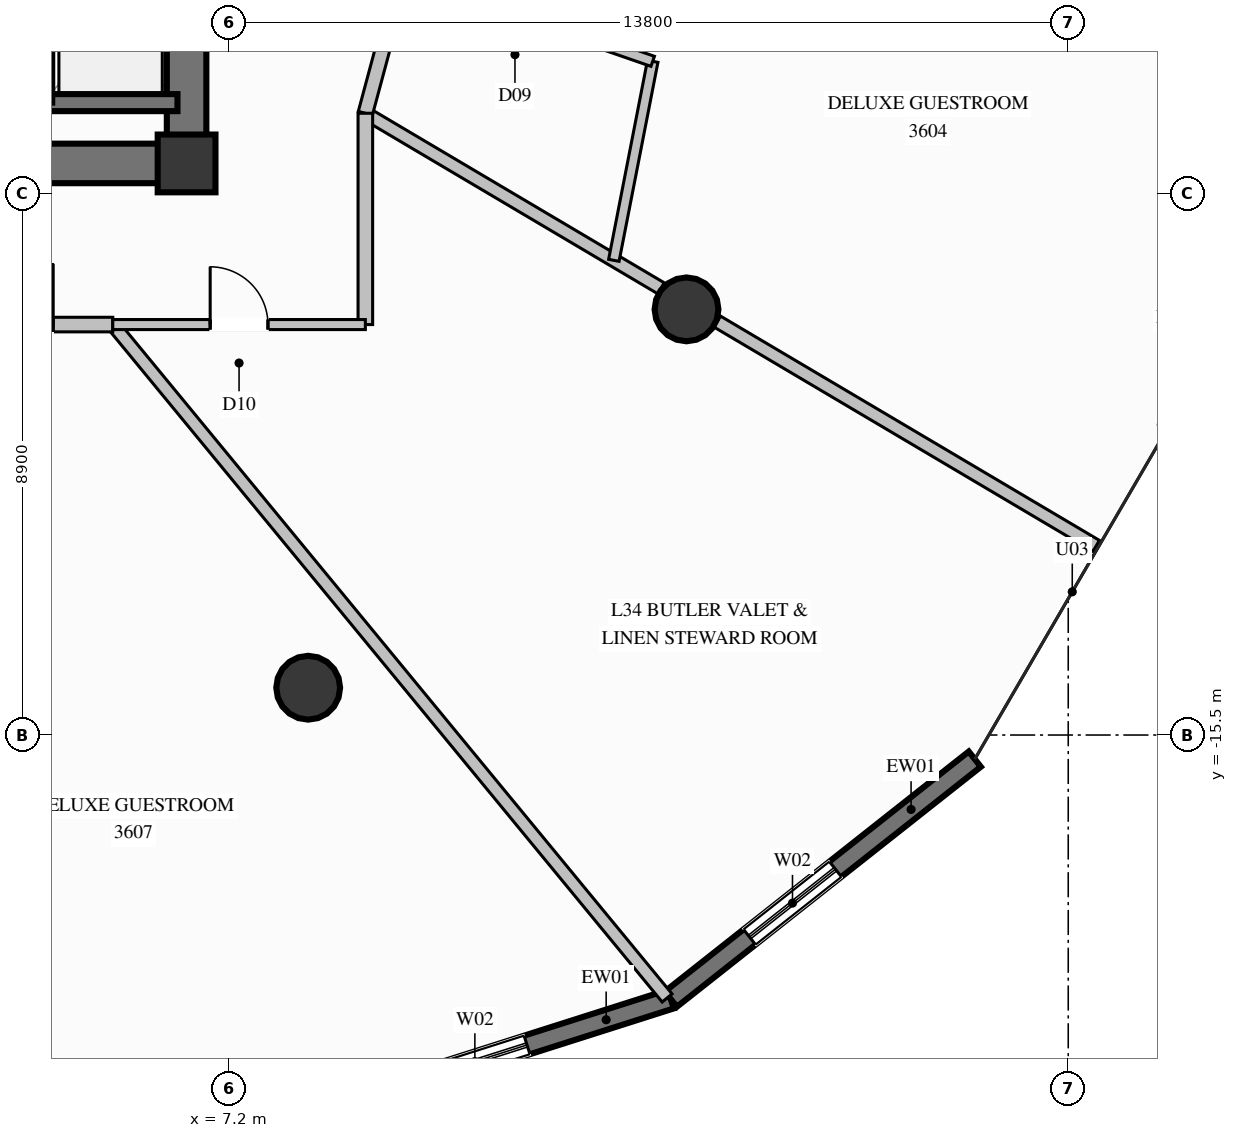
"""IFC4 building model, lengths in metres.
Left out: names, types, materials, properties, quantities, classifications, styles, units other than length and angle.
Written with IfcOpenShell. Run it as: python <this file> out.ifc"""

import sys

from ifc_helpers import new_model, si_unit, direction, frame, frame_2d, origin, origin_2d, place, context, subcontext, project, spatial, rectangle, circle, extrude, element, fill, save


model = new_model("IFC4")
c1 = context("Model", 3, precision=1e-05, world=origin(), true_north=direction((0.0, 1.0)))
c2 = subcontext(c1, "Body", "Model", "MODEL_VIEW")
j1 = project(units=[si_unit("LENGTHUNIT", "METRE"), si_unit("PLANEANGLEUNIT", "RADIAN")], contexts=[c1])
p1 = place(None, origin())
s1 = spatial("IfcSite", under=j1, at=p1, CompositionType="ELEMENT")
p2 = place(p1, origin())
s2 = spatial("IfcBuilding", under=s1, at=p2, CompositionType="ELEMENT")
p3 = place(p2, frame((0.0, 0.0, 135.0)))
s3 = spatial("IfcBuildingStorey", under=s2, at=p3, CompositionType="ELEMENT", Elevation=135.0)
p4 = place(p3, frame((6.5, -6.1, 0.0), z_axis=(0.0, 0.0, 1.0), x_axis=(1.0, 0.0, 0.0)))
e1 = element("IfcColumn", 1, at=p4, inside=s3, PredefinedType="COLUMN", context=c2, shape_type="SweptSolid", body=[
    extrude(rectangle(XDim=0.95, YDim=0.95, at=origin_2d()), origin(), (0.0, 0.0, 1.0), 3.6),
])
p5 = place(p3, frame((4.15, -6.1, 0.0), z_axis=(0.0, 0.0, 1.0), x_axis=(1.0, 0.0, 0.0)))
e2 = element("IfcWall", 2, at=p5, inside=s3, PredefinedType="SHEAR", context=c2, shape_type="SweptSolid", body=[
    extrude(rectangle(XDim=2.025, YDim=0.65, at=frame_2d((1.013, 0.0))), origin(), (0.0, 0.0, 1.0), 3.6),
])
p6 = place(p3, frame((6.5, -6.425, 0.0), z_axis=(0.0, 0.0, 1.0), x_axis=(0.0, 1.0, 0.0)))
e3 = element("IfcWall", 3, at=p6, inside=s3, PredefinedType="SHEAR", context=c2, shape_type="SweptSolid", body=[
    extrude(rectangle(XDim=4.075, YDim=0.65, at=frame_2d((2.038, 0.0))), origin(), (0.0, 0.0, 1.0), 3.6),
])
for number, where, z_axis, x_axis in (
    (4, (8.5, -14.722, 0.0), (0.0, 0.0, 1.0), (1.0, 0.0, 0.0)),
    (5, (14.722, -8.5, 0.0), (0.0, 0.0, 1.0), (1.0, 0.0, 0.0)),
):
    element("IfcColumn", number, at=place(p3, frame(where, z_axis=z_axis, x_axis=x_axis)), inside=s3, PredefinedType="COLUMN", context=c2, shape_type="SweptSolid", body=[
        extrude(circle(Radius=0.525, at=origin_2d()), origin(), (0.0, 0.0, 1.0), 3.6),
    ])
p7 = place(p3, frame((14.464, -19.844, 0.0), z_axis=(0.0, 0.0, 1.0), x_axis=(-0.952914626631, -0.303238708533, 0.0)))
e6 = element("IfcWall", 6, at=p7, inside=s3, PredefinedType="SOLIDWALL", context=c2, shape_type="SweptSolid", body=[
    extrude(rectangle(XDim=6.612, YDim=0.32, at=frame_2d((3.306, 0.0))), origin(), (0.0, 0.0, 1.0), 3.35),
])
p8 = place(p7, frame((2.482, 0.0, 0.35)))
e7 = element("IfcOpeningElement", 7, at=p8, cuts=e6, PredefinedType="OPENING", context=c2, shape_type="SweptSolid", body=[
    extrude(rectangle(XDim=1.8, YDim=2.6, at=frame_2d((0.9, 1.3))), frame((0.0, 0.17, 0.0), z_axis=(0.0, -1.0, 0.0), x_axis=(1.0, 0.0, 0.0)), (0.0, 0.0, 1.0), 0.34),
])
p9 = place(p3, frame((19.463, -15.897, 0.0), z_axis=(0.0, 0.0, 1.0), x_axis=(-0.784835666651, -0.619703942503, 0.0)))
e8 = element("IfcWall", 8, at=p9, inside=s3, PredefinedType="SOLIDWALL", context=c2, shape_type="SweptSolid", body=[
    extrude(rectangle(XDim=6.369, YDim=0.32, at=frame_2d((3.185, 0.0))), origin(), (0.0, 0.0, 1.0), 3.35),
])
p10 = place(p9, frame((2.92, 0.0, 0.35)))
e9 = element("IfcOpeningElement", 9, at=p10, cuts=e8, PredefinedType="OPENING", context=c2, shape_type="SweptSolid", body=[
    extrude(rectangle(XDim=1.8, YDim=2.6, at=frame_2d((0.9, 1.3))), frame((0.0, 0.17, 0.0), z_axis=(0.0, -1.0, 0.0), x_axis=(1.0, 0.0, 0.0)), (0.0, 0.0, 1.0), 0.34),
])
p11 = place(p3, frame((4.15, -5.1, 0.0), z_axis=(0.0, 0.0, 1.0), x_axis=(1.0, 0.0, 0.0)))
e10 = element("IfcWall", 10, at=p11, inside=s3, PredefinedType="SOLIDWALL", context=c2, shape_type="SweptSolid", body=[
    extrude(rectangle(XDim=2.2, YDim=0.28, at=frame_2d((1.1, 0.0))), origin(), (0.0, 0.0, 1.0), 3.35),
])
p12 = place(p3, frame((4.15, -2.4, 0.0), z_axis=(0.0, 0.0, 1.0), x_axis=(0.0, -1.0, 0.0)))
e11 = element("IfcWall", 11, at=p12, inside=s3, PredefinedType="SOLIDWALL", context=c2, shape_type="SweptSolid", body=[
    extrude(rectangle(XDim=2.7, YDim=0.28, at=frame_2d((1.35, 0.0))), origin(), (0.0, 0.0, 1.0), 3.35),
])
p13 = place(p3, frame((9.44, -5.275, 0.0), z_axis=(0.0, 0.0, 1.0), x_axis=(0.860527977628, -0.509403179927, 0.0)))
e12 = element("IfcWall", 12, at=p13, inside=s3, PredefinedType="PARTITIONING", context=c2, shape_type="SweptSolid", body=[
    extrude(rectangle(XDim=5.65, YDim=0.21, at=frame_2d((2.825, 0.0))), origin(), (0.0, 0.0, 1.0), 2.717),
])
p14 = place(p3, frame((15.228, -8.701, 0.0), z_axis=(0.0, 0.0, 1.0), x_axis=(0.860535668123, -0.509390188253, 0.0)))
e13 = element("IfcWall", 13, at=p14, inside=s3, PredefinedType="PARTITIONING", context=c2, shape_type="SweptSolid", body=[
    extrude(rectangle(XDim=7.242, YDim=0.21, at=frame_2d((3.621, 0.0))), origin(), (0.0, 0.0, 1.0), 3.35),
])
p15 = place(p3, frame((9.44, -5.275, 0.0), z_axis=(0.0, 0.0, 1.0), x_axis=(0.25988439237, 0.965639737481, 0.0)))
e14 = element("IfcWall", 14, at=p15, inside=s3, PredefinedType="PARTITIONING", context=c2, shape_type="SweptSolid", body=[
    extrude(rectangle(XDim=2.359, YDim=0.24, at=frame_2d((1.179, 0.0))), origin(), (0.0, 0.0, 1.0), 3.35),
])
p16 = place(p3, frame((13.527, -7.694, 0.0), z_axis=(0.0, 0.0, 1.0), x_axis=(0.191580880293, 0.981476829225, 0.0)))
e15 = element("IfcWall", 15, at=p16, inside=s3, PredefinedType="PLUMBINGWALL", context=c2, shape_type="SweptSolid", body=[
    extrude(rectangle(XDim=3.335, YDim=0.175, at=frame_2d((1.667, 0.0))), origin(), (0.0, 0.0, 1.0), 3.35),
])
p17 = place(p3, frame((10.053, -2.997, 0.0), z_axis=(0.0, 0.0, 1.0), x_axis=(0.944980071375, -0.327127902669, 0.0)))
e16 = element("IfcWall", 16, at=p17, inside=s3, PredefinedType="PLUMBINGWALL", context=c2, shape_type="SweptSolid", body=[
    extrude(rectangle(XDim=4.353, YDim=0.175, at=frame_2d((2.176, 0.0))), origin(), (0.0, 0.0, 1.0), 3.35),
])
p18 = place(p17, frame((1.726, 0.0, 0.0)))
e17 = element("IfcOpeningElement", 17, at=p18, cuts=e16, PredefinedType="OPENING", context=c2, shape_type="SweptSolid", body=[
    extrude(rectangle(XDim=0.9, YDim=2.1, at=frame_2d((0.45, 1.05))), frame((0.0, 0.098, 0.0), z_axis=(0.0, -1.0, 0.0), x_axis=(1.0, 0.0, 0.0)), (0.0, 0.0, 1.0), 0.195),
])
p19 = place(p3, frame((5.286, -8.75, 0.0), z_axis=(0.0, 0.0, 1.0), x_axis=(0.635601055051, -0.772017680379, 0.0)))
e18 = element("IfcWall", 18, at=p19, inside=s3, PredefinedType="PARTITIONING", context=c2, shape_type="SweptSolid", body=[
    extrude(rectangle(XDim=14.344, YDim=0.21, at=frame_2d((7.172, 0.0))), origin(), (0.0, 0.0, 1.0), 3.35),
])
p20 = place(p3, frame((2.326, -8.75, 0.0), z_axis=(0.0, 0.0, 1.0), x_axis=(1.0, 0.0, 0.0)))
e19 = element("IfcWall", 19, at=p20, inside=s3, PredefinedType="PARTITIONING", context=c2, shape_type="SweptSolid", body=[
    extrude(rectangle(XDim=2.96, YDim=0.24, at=frame_2d((1.48, 0.0))), origin(), (0.0, 0.0, 1.0), 3.35),
])
p21 = place(p20, frame((0.98, 0.0, 0.0)))
e20 = element("IfcOpeningElement", 20, at=p21, cuts=e19, PredefinedType="OPENING", context=c2, shape_type="SweptSolid", body=[
    extrude(rectangle(XDim=1.0, YDim=2.2, at=frame_2d((0.5, 1.1))), frame((0.0, 0.13, 0.0), z_axis=(0.0, -1.0, 0.0), x_axis=(1.0, 0.0, 0.0)), (0.0, 0.0, 1.0), 0.26),
])
p22 = place(p3, frame((9.44, -8.75, 0.0), z_axis=(0.0, 0.0, 1.0), x_axis=(0.0, 1.0, 0.0)))
e21 = element("IfcWall", 21, at=p22, inside=s3, PredefinedType="PARTITIONING", context=c2, shape_type="SweptSolid", body=[
    extrude(rectangle(XDim=3.475, YDim=0.24, at=frame_2d((1.738, 0.0))), origin(), (0.0, 0.0, 1.0), 3.35),
])
p23 = place(p3, frame((5.286, -8.75, 0.0), z_axis=(0.0, 0.0, 1.0), x_axis=(1.0, 0.0, 0.0)))
e22 = element("IfcWall", 22, at=p23, inside=s3, PredefinedType="PARTITIONING", context=c2, shape_type="SweptSolid", body=[
    extrude(rectangle(XDim=4.154, YDim=0.165, at=frame_2d((2.077, 0.0))), origin(), (0.0, 0.0, 1.0), 3.35),
])
p24 = place(p23, frame((1.602, 0.0, 0.0)))
e23 = element("IfcOpeningElement", 23, at=p24, cuts=e22, PredefinedType="OPENING", context=c2, shape_type="SweptSolid", body=[
    extrude(rectangle(XDim=0.95, YDim=2.1, at=frame_2d((0.475, 1.05))), frame((0.0, 0.093, 0.0), z_axis=(0.0, -1.0, 0.0), x_axis=(1.0, 0.0, 0.0)), (0.0, 0.0, 1.0), 0.185),
])
p25 = place(p8, origin())
e24 = element("IfcWindow", 24, at=p25, inside=s3, PartitioningType="SINGLE_PANEL", PredefinedType="WINDOW", context=c2, shape_type="SweptSolid", body=[
    extrude(rectangle(XDim=1.8, YDim=2.6, at=frame_2d((0.9, 1.3))), frame((0.0, 0.03, 0.0), z_axis=(0.0, -1.0, 0.0), x_axis=(1.0, 0.0, 0.0)), (0.0, 0.0, 1.0), 0.06),
])
fill(e7, e24)
p26 = place(p10, origin())
e25 = element("IfcWindow", 25, at=p26, inside=s3, PartitioningType="SINGLE_PANEL", PredefinedType="WINDOW", context=c2, shape_type="SweptSolid", body=[
    extrude(rectangle(XDim=1.8, YDim=2.6, at=frame_2d((0.9, 1.3))), frame((0.0, 0.03, 0.0), z_axis=(0.0, -1.0, 0.0), x_axis=(1.0, 0.0, 0.0)), (0.0, 0.0, 1.0), 0.06),
])
fill(e9, e25)
p27 = place(p21, origin())
e26 = element("IfcDoor", 26, at=p27, inside=s3, OperationType="SINGLE_SWING_RIGHT", PredefinedType="DOOR", context=c2, shape_type="SweptSolid", body=[
    extrude(rectangle(XDim=1.0, YDim=2.2, at=frame_2d((0.5, 1.1))), frame((0.0, 0.025, 0.0), z_axis=(0.0, -1.0, 0.0), x_axis=(1.0, 0.0, 0.0)), (0.0, 0.0, 1.0), 0.05),
])
fill(e20, e26)
p28 = place(p24, origin())
e27 = element("IfcDoor", 27, at=p28, inside=s3, OperationType="SINGLE_SWING_LEFT", PredefinedType="DOOR", context=c2, shape_type="SweptSolid", body=[
    extrude(rectangle(XDim=0.95, YDim=2.1, at=frame_2d((0.475, 1.05))), frame((0.0, 0.025, 0.0), z_axis=(0.0, -1.0, 0.0), x_axis=(1.0, 0.0, 0.0)), (0.0, 0.0, 1.0), 0.05),
])
fill(e23, e27)
save(model, sys.argv[1])
